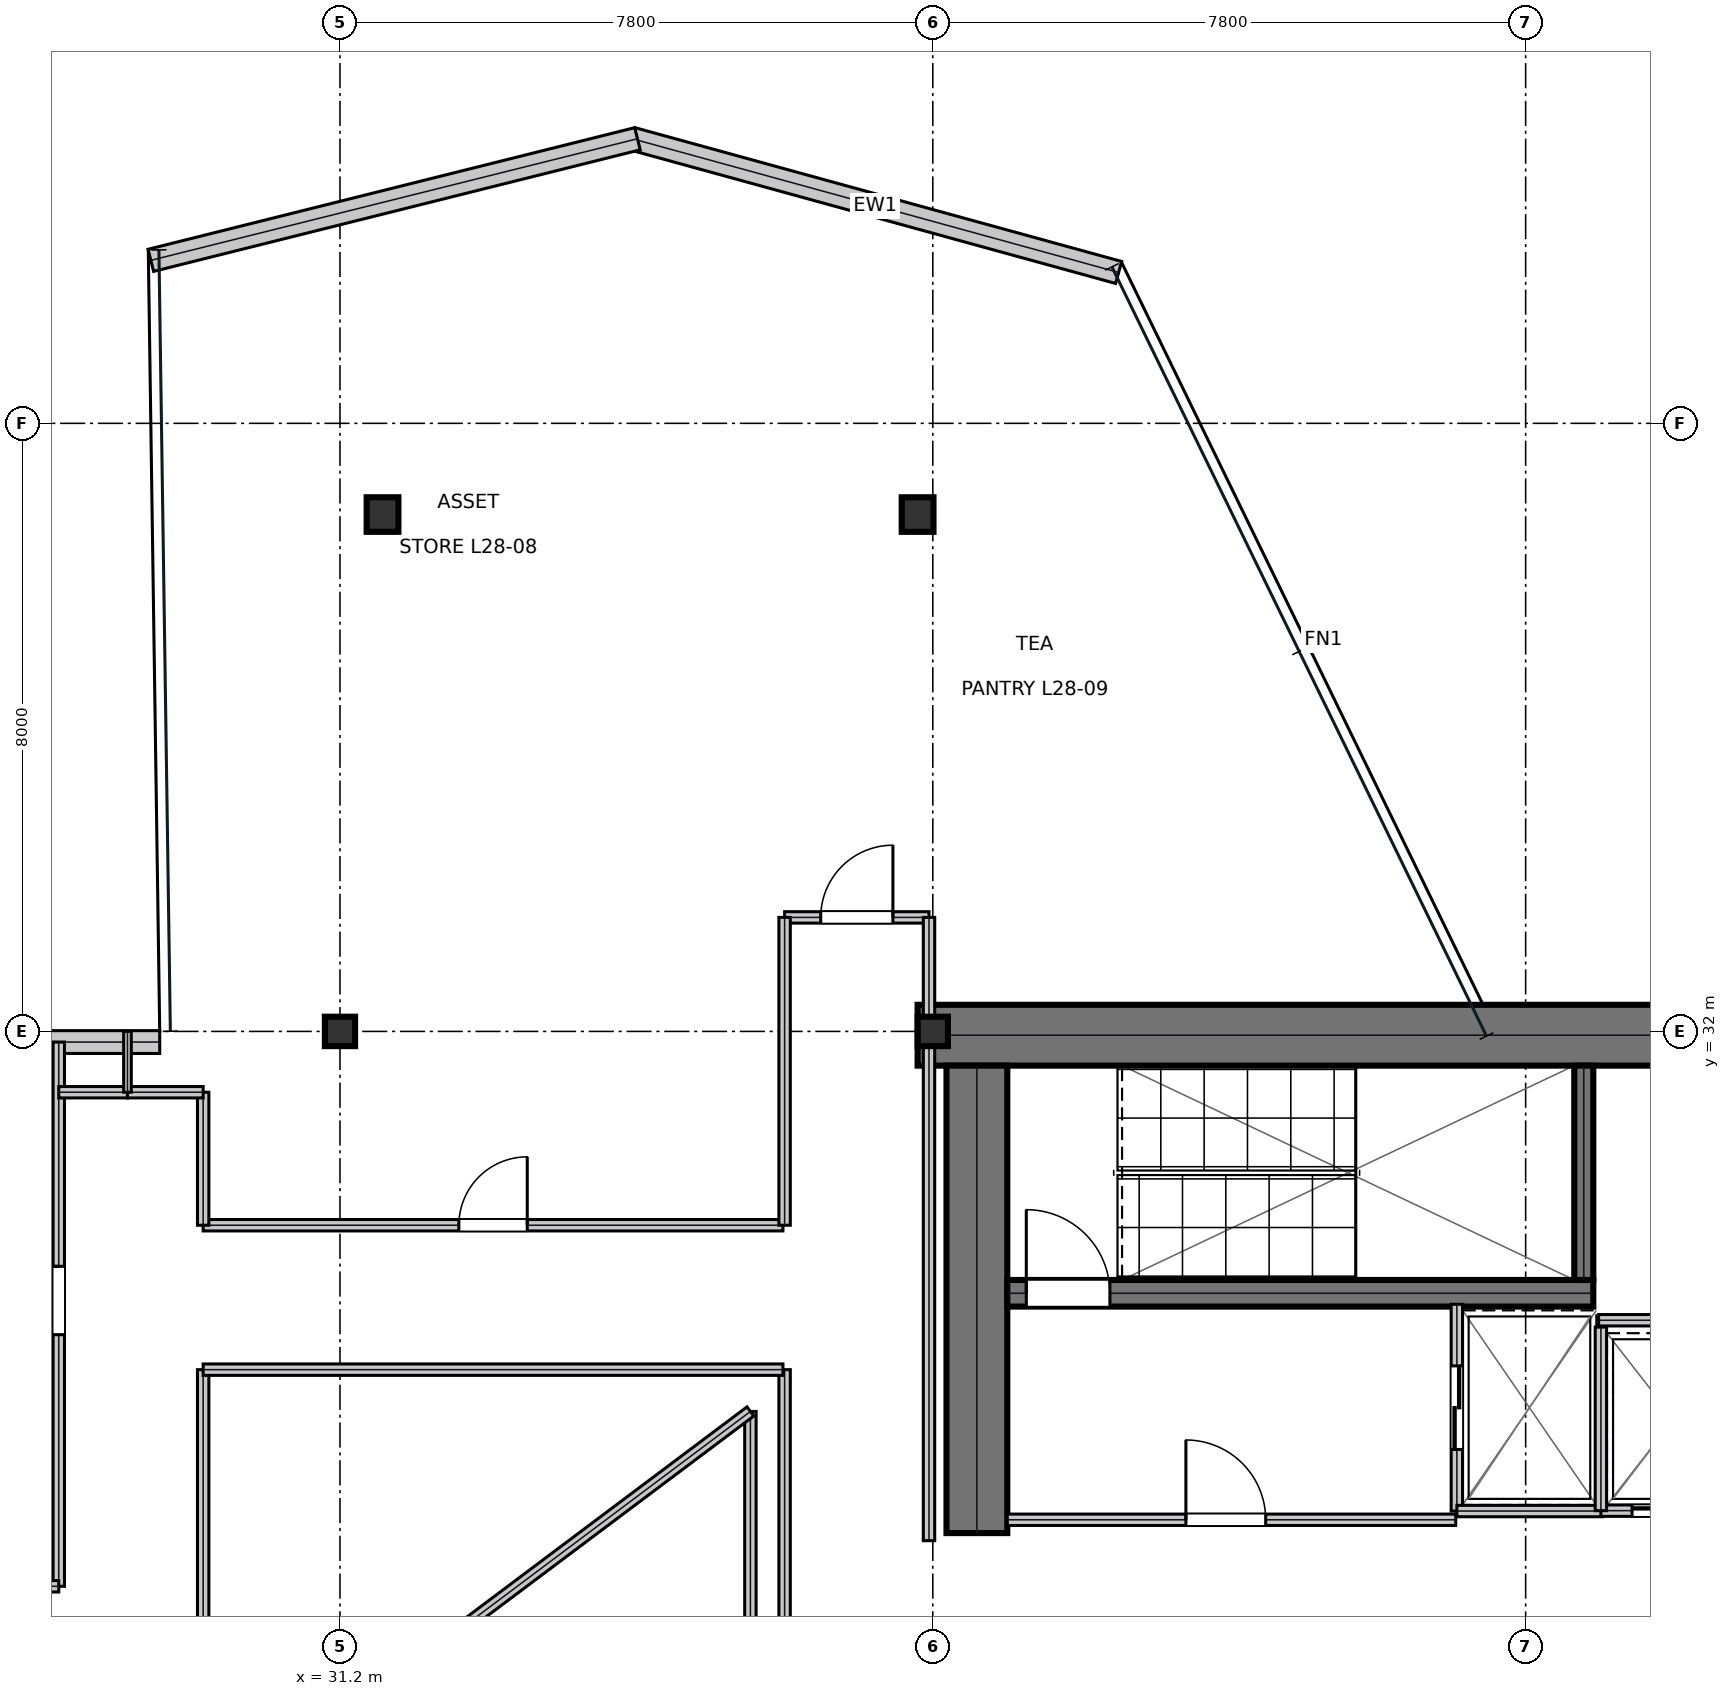
"""IFC4 building model, lengths in metres.
Left out: names, types, materials, properties, quantities, classifications, styles, units other than length and angle.
Written with IfcOpenShell. Run it as: python <this file> out.ifc"""

import sys

from ifc_helpers import new_model, si_unit, direction, frame, frame_2d, origin, origin_2d, place, context, subcontext, project, spatial, rectangle, i_section, extrude, element, fill, save


model = new_model("IFC4")
c1 = context("Model", 3, precision=1e-05, world=origin(), true_north=direction((0.0, 1.0)))
c2 = subcontext(c1, "Body", "Model", "MODEL_VIEW")
j1 = project(units=[si_unit("LENGTHUNIT", "METRE"), si_unit("PLANEANGLEUNIT", "RADIAN")], contexts=[c1])
p1 = place(None, origin())
s1 = spatial("IfcSite", under=j1, at=p1, CompositionType="ELEMENT")
p2 = place(p1, origin())
s2 = spatial("IfcBuilding", under=s1, at=p2, CompositionType="ELEMENT")
p3 = place(p2, frame((0.0, 0.0, 124.95)))
s3 = spatial("IfcBuildingStorey", under=s2, at=p3, CompositionType="ELEMENT", Elevation=124.95)
p4 = place(p3, frame((38.8, 31.95, 0.0), z_axis=(0.0, 0.0, 1.0), x_axis=(1.0, 0.0, 0.0)))
e1 = element("IfcWall", 1, at=p4, inside=s3, PredefinedType="SHEAR", context=c2, shape_type="SweptSolid", body=[
    extrude(rectangle(XDim=16.0, YDim=0.8, at=frame_2d((8.0, 0.0))), origin(), (0.0, 0.0, 1.0), 3.81),
])
p5 = place(p3, frame((39.58, 25.4, 0.0), z_axis=(0.0, 0.0, 1.0), x_axis=(0.0, 1.0, 0.0)))
e2 = element("IfcWall", 2, at=p5, inside=s3, PredefinedType="SHEAR", context=c2, shape_type="SweptSolid", body=[
    extrude(rectangle(XDim=6.15, YDim=0.8, at=frame_2d((3.075, 0.0))), origin(), (0.0, 0.0, 1.0), 3.81),
])
p6 = place(p3, frame((39.98, 28.555, 0.0), z_axis=(0.0, 0.0, 1.0), x_axis=(1.0, 0.0, 0.0)))
e3 = element("IfcWall", 3, at=p6, inside=s3, PredefinedType="SHEAR", context=c2, shape_type="SweptSolid", body=[
    extrude(rectangle(XDim=7.71, YDim=0.35, at=frame_2d((3.855, 0.0))), origin(), (0.0, 0.0, 1.0), 3.81),
])
p7 = place(p6, frame((0.25, 0.0, 0.0)))
e4 = element("IfcOpeningElement", 4, at=p7, cuts=e3, PredefinedType="OPENING", context=c2, shape_type="SweptSolid", body=[
    extrude(rectangle(XDim=1.1, YDim=2.15, at=frame_2d((0.55, 1.075))), frame((0.0, 0.185, 0.0), z_axis=(0.0, -1.0, 0.0), x_axis=(1.0, 0.0, 0.0)), (0.0, 0.0, 1.0), 0.37),
])
p8 = place(p3, frame((47.565, 28.73, 0.0), z_axis=(0.0, 0.0, 1.0), x_axis=(0.0, 1.0, 0.0)))
e5 = element("IfcWall", 5, at=p8, inside=s3, PredefinedType="SHEAR", context=c2, shape_type="SweptSolid", body=[
    extrude(rectangle(XDim=2.82, YDim=0.25, at=frame_2d((1.41, 0.0))), origin(), (0.0, 0.0, 1.0), 3.81),
])
for number, where, z_axis, x_axis in (
    (6, (31.2, 32.0, 0.0), (0.0, 0.0, 1.0), (1.0, 0.0, 0.0)),
    (7, (39.0, 32.0, 0.0), (0.0, 0.0, 1.0), (1.0, 0.0, 0.0)),
):
    element("IfcColumn", number, at=place(p3, frame(where, z_axis=z_axis, x_axis=x_axis)), inside=s3, PredefinedType="COLUMN", context=c2, shape_type="SweptSolid", body=[
        extrude(i_section(OverallWidth=0.398, OverallDepth=0.387, WebThickness=0.021, FlangeThickness=0.033, at=origin_2d()), origin(), (0.0, 0.0, 1.0), 4.044),
    ])
p9 = place(p3, frame((31.76, 38.8, 0.016), z_axis=(0.017424577167, -0.037338379644, 0.999150754149), x_axis=(0.906183139995, 0.422885465331, 0.0)))
e8 = element("IfcColumn", 8, at=p9, inside=s3, PredefinedType="COLUMN", context=c2, shape_type="SweptSolid", body=[
    extrude(i_section(OverallWidth=0.418, OverallDepth=0.455, WebThickness=0.042, FlangeThickness=0.068, at=origin_2d()), origin(), (0.0, 0.0, 1.0), 4.021),
])
p10 = place(p3, frame((38.8, 38.8, 0.016), z_axis=(-0.006254246892, -0.037343318823, 0.999282923368), x_axis=(0.986263587143, -0.165179104839, 0.0)))
e9 = element("IfcColumn", 9, at=p10, inside=s3, PredefinedType="COLUMN", context=c2, shape_type="SweptSolid", body=[
    extrude(i_section(OverallWidth=0.418, OverallDepth=0.455, WebThickness=0.042, FlangeThickness=0.068, at=origin_2d()), origin(), (0.0, 0.0, 1.0), 4.021),
])
p11 = place(p3, frame((41.445, 41.985, 0.0), z_axis=(0.0, 0.0, 1.0), x_axis=(-0.96422724659, 0.265077001894, 0.0)))
e10 = element("IfcWall", 10, at=p11, inside=s3, PredefinedType="STANDARD", context=c2, shape_type="SweptSolid", body=[
    extrude(rectangle(XDim=6.64, YDim=0.3, at=frame_2d((3.32, 0.0))), origin(), (0.0, 0.0, 1.0), 3.81),
])
p12 = place(p3, frame((35.114, 43.744, 0.0), z_axis=(0.0, 0.0, 1.0), x_axis=(-0.970168608955, -0.242431165897, 0.0)))
e11 = element("IfcWall", 11, at=p12, inside=s3, PredefinedType="STANDARD", context=c2, shape_type="SweptSolid", body=[
    extrude(rectangle(XDim=6.599, YDim=0.3, at=frame_2d((3.3, 0.0))), origin(), (0.0, 0.0, 1.0), 3.81),
])
p13 = place(p3, frame((28.828, 31.86, 0.0), z_axis=(0.0, 0.0, 1.0), x_axis=(-1.0, 0.0, 0.0)))
e12 = element("IfcWall", 12, at=p13, inside=s3, PredefinedType="STANDARD", context=c2, shape_type="SweptSolid", body=[
    extrude(rectangle(XDim=2.788, YDim=0.3, at=frame_2d((1.394, 0.0))), origin(), (0.0, 0.0, 1.0), 3.81),
])
p14 = place(p3, frame((39.98, 25.575, 0.0), z_axis=(0.0, 0.0, 1.0), x_axis=(1.0, 0.0, 0.0)))
e13 = element("IfcWall", 13, at=p14, inside=s3, PredefinedType="PARTITIONING", context=c2, shape_type="SweptSolid", body=[
    extrude(rectangle(XDim=5.9, YDim=0.15, at=frame_2d((2.95, 0.0))), origin(), (0.0, 0.0, 1.0), 3.81),
])
p15 = place(p14, frame((2.35, 0.0, 0.0)))
e14 = element("IfcOpeningElement", 14, at=p15, cuts=e13, PredefinedType="OPENING", context=c2, shape_type="SweptSolid", body=[
    extrude(rectangle(XDim=1.05, YDim=2.15, at=frame_2d((0.525, 1.075))), frame((0.0, 0.085, 0.0), z_axis=(0.0, -1.0, 0.0), x_axis=(1.0, 0.0, 0.0)), (0.0, 0.0, 1.0), 0.17),
])
p16 = place(p3, frame((45.895, 25.69, 0.0), z_axis=(0.0, 0.0, 1.0), x_axis=(0.0, 1.0, 0.0)))
e15 = element("IfcWall", 15, at=p16, inside=s3, PredefinedType="PARTITIONING", context=c2, shape_type="SweptSolid", body=[
    extrude(rectangle(XDim=2.72, YDim=0.15, at=frame_2d((1.36, 0.0))), origin(), (0.0, 0.0, 1.0), 3.81),
])
p17 = place(p16, frame((0.81, 0.0, 0.0)))
e16 = element("IfcOpeningElement", 16, at=p17, cuts=e15, PredefinedType="OPENING", context=c2, shape_type="SweptSolid", body=[
    extrude(rectangle(XDim=1.1, YDim=2.15, at=frame_2d((0.55, 1.075))), frame((0.0, 0.085, 0.0), z_axis=(0.0, -1.0, 0.0), x_axis=(1.0, 0.0, 0.0)), (0.0, 0.0, 1.0), 0.17),
])
p18 = place(p3, frame((45.895, 25.69, 0.0), z_axis=(0.0, 0.0, 1.0), x_axis=(1.0, 0.0, 0.0)))
e17 = element("IfcWall", 17, at=p18, inside=s3, PredefinedType="PARTITIONING", context=c2, shape_type="SweptSolid", body=[
    extrude(rectangle(XDim=1.915, YDim=0.15, at=frame_2d((0.958, 0.0))), origin(), (0.0, 0.0, 1.0), 3.81),
])
p19 = place(p3, frame((47.79, 25.695, 0.0), z_axis=(0.0, 0.0, 1.0), x_axis=(1.0, 0.0, 0.0)))
e18 = element("IfcWall", 18, at=p19, inside=s3, PredefinedType="PARTITIONING", context=c2, shape_type="SweptSolid", body=[
    extrude(rectangle(XDim=1.92, YDim=0.15, at=frame_2d((0.96, 0.0))), origin(), (0.0, 0.0, 1.0), 3.81),
])
p20 = place(p19, frame((0.41, 0.0, 0.0)))
e19 = element("IfcOpeningElement", 19, at=p20, cuts=e18, PredefinedType="OPENING", context=c2, shape_type="SweptSolid", body=[
    extrude(rectangle(XDim=1.1, YDim=2.15, at=frame_2d((0.55, 1.075))), frame((0.0, 0.085, 0.0), z_axis=(0.0, -1.0, 0.0), x_axis=(1.0, 0.0, 0.0)), (0.0, 0.0, 1.0), 0.17),
])
p21 = place(p3, frame((47.79, 25.695, 0.0), z_axis=(0.0, 0.0, 1.0), x_axis=(0.0, 1.0, 0.0)))
e20 = element("IfcWall", 20, at=p21, inside=s3, PredefinedType="PARTITIONING", context=c2, shape_type="SweptSolid", body=[
    extrude(rectangle(XDim=2.415, YDim=0.15, at=frame_2d((1.208, 0.0))), origin(), (0.0, 0.0, 1.0), 3.81),
])
p22 = place(p3, frame((47.76, 28.2, 0.0), z_axis=(0.0, 0.0, 1.0), x_axis=(1.0, 0.0, 0.0)))
e21 = element("IfcWall", 21, at=p22, inside=s3, PredefinedType="PARTITIONING", context=c2, shape_type="SweptSolid", body=[
    extrude(rectangle(XDim=1.99, YDim=0.15, at=frame_2d((0.995, 0.0))), origin(), (0.0, 0.0, 1.0), 3.81),
])
p23 = place(p3, frame((37.05, 14.5, 0.0), z_axis=(0.0, 0.0, 1.0), x_axis=(0.0, 1.0, 0.0)))
e22 = element("IfcWall", 22, at=p23, inside=s3, PredefinedType="PARTITIONING", context=c2, shape_type="SweptSolid", body=[
    extrude(rectangle(XDim=13.05, YDim=0.15, at=frame_2d((6.525, 0.0))), origin(), (0.0, 0.0, 1.0), 3.19),
])
p24 = place(p23, frame((4.635, 0.0, 0.0)))
e23 = element("IfcOpeningElement", 23, at=p24, cuts=e22, PredefinedType="OPENING", context=c2, shape_type="SweptSolid", body=[
    extrude(rectangle(XDim=0.9, YDim=2.15, at=frame_2d((0.45, 1.075))), frame((0.0, 0.085, 0.0), z_axis=(0.0, -1.0, 0.0), x_axis=(1.0, 0.0, 0.0)), (0.0, 0.0, 1.0), 0.17),
])
p25 = place(p3, frame((27.5, 24.7, 0.0), z_axis=(0.0, 0.0, 1.0), x_axis=(0.0, 1.0, 0.0)))
e24 = element("IfcWall", 24, at=p25, inside=s3, PredefinedType="PARTITIONING", context=c2, shape_type="SweptSolid", body=[
    extrude(rectangle(XDim=7.16, YDim=0.15, at=frame_2d((3.58, 0.0))), origin(), (0.0, 0.0, 1.0), 3.338),
])
p26 = place(p25, frame((3.31, 0.0, 0.0)))
e25 = element("IfcOpeningElement", 25, at=p26, cuts=e24, PredefinedType="OPENING", context=c2, shape_type="SweptSolid", body=[
    extrude(rectangle(XDim=0.9, YDim=2.15, at=frame_2d((0.45, 1.075))), frame((0.0, 0.085, 0.0), z_axis=(0.0, -1.0, 0.0), x_axis=(1.0, 0.0, 0.0)), (0.0, 0.0, 1.0), 0.17),
])
p27 = place(p3, frame((29.4, 29.45, 0.0), z_axis=(0.0, 0.0, 1.0), x_axis=(1.0, 0.0, 0.0)))
e26 = element("IfcWall", 26, at=p27, inside=s3, PredefinedType="PARTITIONING", context=c2, shape_type="SweptSolid", body=[
    extrude(rectangle(XDim=7.628, YDim=0.15, at=frame_2d((3.814, 0.0))), origin(), (0.0, 0.0, 1.0), 3.19),
])
p28 = place(p27, frame((3.364, 0.0, 0.0)))
e27 = element("IfcOpeningElement", 27, at=p28, cuts=e26, PredefinedType="OPENING", context=c2, shape_type="SweptSolid", body=[
    extrude(rectangle(XDim=0.9, YDim=2.15, at=frame_2d((0.45, 1.075))), frame((0.0, 0.085, 0.0), z_axis=(0.0, -1.0, 0.0), x_axis=(1.0, 0.0, 0.0)), (0.0, 0.0, 1.0), 0.17),
])
p29 = place(p3, frame((37.05, 33.5, 0.0), z_axis=(0.0, 0.0, 1.0), x_axis=(1.0, 0.0, 0.0)))
e28 = element("IfcWall", 28, at=p29, inside=s3, PredefinedType="PARTITIONING", context=c2, shape_type="SweptSolid", body=[
    extrude(rectangle(XDim=1.9, YDim=0.15, at=frame_2d((0.95, 0.0))), origin(), (0.0, 0.0, 1.0), 3.19),
])
p30 = place(p29, frame((0.475, 0.0, 0.0)))
e29 = element("IfcOpeningElement", 29, at=p30, cuts=e28, PredefinedType="OPENING", context=c2, shape_type="SweptSolid", body=[
    extrude(rectangle(XDim=0.95, YDim=2.15, at=frame_2d((0.475, 1.075))), frame((0.0, 0.085, 0.0), z_axis=(0.0, -1.0, 0.0), x_axis=(1.0, 0.0, 0.0)), (0.0, 0.0, 1.0), 0.17),
])
p31 = place(p3, frame((29.4, 16.8, 0.0), z_axis=(0.0, 0.0, 1.0), x_axis=(0.0, 1.0, 0.0)))
e30 = element("IfcWall", 30, at=p31, inside=s3, PredefinedType="PARTITIONING", context=c2, shape_type="SweptSolid", body=[
    extrude(rectangle(XDim=10.75, YDim=0.15, at=frame_2d((5.375, 0.0))), origin(), (0.0, 0.0, 1.0), 3.19),
])
p32 = place(p3, frame((29.4, 27.55, 0.0), z_axis=(0.0, 0.0, 1.0), x_axis=(1.0, 0.0, 0.0)))
e31 = element("IfcWall", 31, at=p32, inside=s3, PredefinedType="PARTITIONING", context=c2, shape_type="SweptSolid", body=[
    extrude(rectangle(XDim=7.628, YDim=0.15, at=frame_2d((3.814, 0.0))), origin(), (0.0, 0.0, 1.0), 3.19),
])
p33 = place(p3, frame((23.1, 24.7, 0.0), z_axis=(0.0, 0.0, 1.0), x_axis=(1.0, 0.0, 0.0)))
e32 = element("IfcWall", 32, at=p33, inside=s3, PredefinedType="PARTITIONING", context=c2, shape_type="SweptSolid", body=[
    extrude(rectangle(XDim=4.4, YDim=0.15, at=frame_2d((2.2, 0.0))), origin(), (0.0, 0.0, 1.0), 3.19),
])
p34 = place(p3, frame((27.5, 31.2, 0.0), z_axis=(0.0, 0.0, 1.0), x_axis=(1.0, 0.0, 0.0)))
e33 = element("IfcWall", 33, at=p34, inside=s3, PredefinedType="PARTITIONING", context=c2, shape_type="SweptSolid", body=[
    extrude(rectangle(XDim=0.904, YDim=0.15, at=frame_2d((0.452, 0.0))), origin(), (0.0, 0.0, 1.0), 3.338),
])
p35 = place(p3, frame((37.05, 29.45, 0.0), z_axis=(0.0, 0.0, 1.0), x_axis=(0.0, 1.0, 0.0)))
e34 = element("IfcWall", 34, at=p35, inside=s3, PredefinedType="PARTITIONING", context=c2, shape_type="SweptSolid", body=[
    extrude(rectangle(XDim=4.05, YDim=0.15, at=frame_2d((2.025, 0.0))), origin(), (0.0, 0.0, 1.0), 3.19),
])
p36 = place(p3, frame((29.4, 29.45, 0.0), z_axis=(0.0, 0.0, 1.0), x_axis=(0.0, 1.0, 0.0)))
e35 = element("IfcWall", 35, at=p36, inside=s3, PredefinedType="PARTITIONING", context=c2, shape_type="SweptSolid", body=[
    extrude(rectangle(XDim=1.75, YDim=0.15, at=frame_2d((0.875, 0.0))), origin(), (0.0, 0.0, 1.0), 3.81),
])
p37 = place(p3, frame((28.404, 31.2, 0.0), z_axis=(0.0, 0.0, 1.0), x_axis=(1.0, 0.0, 0.0)))
e36 = element("IfcWall", 36, at=p37, inside=s3, PredefinedType="PARTITIONING", context=c2, shape_type="SweptSolid", body=[
    extrude(rectangle(XDim=0.996, YDim=0.15, at=frame_2d((0.498, 0.0))), origin(), (0.0, 0.0, 1.0), 3.81),
])
p38 = place(p3, frame((38.95, 25.3, 0.0), z_axis=(0.0, 0.0, 1.0), x_axis=(0.0, 1.0, 0.0)))
e37 = element("IfcWall", 37, at=p38, inside=s3, PredefinedType="PARTITIONING", context=c2, shape_type="SweptSolid", body=[
    extrude(rectangle(XDim=8.2, YDim=0.15, at=frame_2d((4.1, 0.0))), origin(), (0.0, 0.0, 1.0), 3.19),
])
p39 = place(p3, frame((28.404, 31.2, 0.0), z_axis=(0.0, 0.0, 1.0), x_axis=(0.0, 1.0, 0.0)))
e38 = element("IfcWall", 38, at=p39, inside=s3, PredefinedType="PARTITIONING", context=c2, shape_type="SweptSolid", body=[
    extrude(rectangle(XDim=0.8, YDim=0.1, at=frame_2d((0.4, 0.0))), origin(), (0.0, 0.0, 1.0), 3.338),
])
p40 = place(p3, frame((36.6, 21.0, 0.0), z_axis=(0.0, 0.0, 1.0), x_axis=(0.0, 1.0, 0.0)))
e39 = element("IfcWall", 39, at=p40, inside=s3, PredefinedType="MOVABLE", context=c2, shape_type="SweptSolid", body=[
    extrude(rectangle(XDim=6.0, YDim=0.15, at=frame_2d((3.0, 0.0))), origin(), (0.0, 0.0, 1.0), 3.81),
])
p41 = place(p3, frame((36.6, 27.0, 0.0), z_axis=(0.0, 0.0, 1.0), x_axis=(-0.8, -0.6, 0.0)))
e40 = element("IfcWall", 40, at=p41, inside=s3, PredefinedType="MOVABLE", context=c2, shape_type="SweptSolid", body=[
    extrude(rectangle(XDim=5.0, YDim=0.15, at=frame_2d((2.5, 0.0))), origin(), (0.0, 0.0, 1.0), 3.81),
])
p42 = place(p15, origin())
e41 = element("IfcDoor", 41, at=p42, inside=s3, OperationType="SINGLE_SWING_LEFT", PredefinedType="DOOR", context=c2, shape_type="SweptSolid", body=[
    extrude(rectangle(XDim=1.05, YDim=2.15, at=frame_2d((0.525, 1.075))), frame((0.0, 0.025, 0.0), z_axis=(0.0, -1.0, 0.0), x_axis=(1.0, 0.0, 0.0)), (0.0, 0.0, 1.0), 0.05),
])
fill(e14, e41)
p43 = place(p17, frame((1.1, 0.0, 0.0), z_axis=(0.0, 0.0, 1.0), x_axis=(-1.0, 0.0, 0.0)))
e42 = element("IfcDoor", 42, at=p43, inside=s3, OperationType="DOUBLE_DOOR_SLIDING", PredefinedType="DOOR", context=c2, shape_type="SweptSolid", body=[
    extrude(rectangle(XDim=1.1, YDim=2.15, at=frame_2d((0.55, 1.075))), frame((0.0, 0.025, 0.0), z_axis=(0.0, -1.0, 0.0), x_axis=(1.0, 0.0, 0.0)), (0.0, 0.0, 1.0), 0.05),
])
fill(e16, e42)
p44 = place(p20, frame((1.1, 0.0, 0.0), z_axis=(0.0, 0.0, 1.0), x_axis=(-1.0, 0.0, 0.0)))
e43 = element("IfcDoor", 43, at=p44, inside=s3, OperationType="DOUBLE_DOOR_SLIDING", PredefinedType="DOOR", context=c2, shape_type="SweptSolid", body=[
    extrude(rectangle(XDim=1.1, YDim=2.15, at=frame_2d((0.55, 1.075))), frame((0.0, 0.025, 0.0), z_axis=(0.0, -1.0, 0.0), x_axis=(1.0, 0.0, 0.0)), (0.0, 0.0, 1.0), 0.05),
])
fill(e19, e43)
p45 = place(p26, origin())
e44 = element("IfcDoor", 44, at=p45, inside=s3, OperationType="SINGLE_SWING_RIGHT", PredefinedType="DOOR", context=c2, shape_type="SweptSolid", body=[
    extrude(rectangle(XDim=0.9, YDim=2.15, at=frame_2d((0.45, 1.075))), frame((0.0, 0.025, 0.0), z_axis=(0.0, -1.0, 0.0), x_axis=(1.0, 0.0, 0.0)), (0.0, 0.0, 1.0), 0.05),
])
fill(e25, e44)
p46 = place(p28, origin())
e45 = element("IfcDoor", 45, at=p46, inside=s3, OperationType="SINGLE_SWING_RIGHT", PredefinedType="DOOR", context=c2, shape_type="SweptSolid", body=[
    extrude(rectangle(XDim=0.9, YDim=2.15, at=frame_2d((0.45, 1.075))), frame((0.0, 0.025, 0.0), z_axis=(0.0, -1.0, 0.0), x_axis=(1.0, 0.0, 0.0)), (0.0, 0.0, 1.0), 0.05),
])
fill(e27, e45)
p47 = place(p30, origin())
e46 = element("IfcDoor", 46, at=p47, inside=s3, OperationType="SINGLE_SWING_RIGHT", PredefinedType="DOOR", context=c2, shape_type="SweptSolid", body=[
    extrude(rectangle(XDim=0.95, YDim=2.15, at=frame_2d((0.475, 1.075))), frame((0.0, 0.025, 0.0), z_axis=(0.0, -1.0, 0.0), x_axis=(1.0, 0.0, 0.0)), (0.0, 0.0, 1.0), 0.05),
])
fill(e29, e46)
p48 = place(p7, origin())
e47 = element("IfcDoor", 47, at=p48, inside=s3, OperationType="SINGLE_SWING_LEFT", PredefinedType="DOOR", context=c2, shape_type="SweptSolid", body=[
    extrude(rectangle(XDim=1.1, YDim=2.15, at=frame_2d((0.55, 1.075))), frame((0.0, 0.025, 0.0), z_axis=(0.0, -1.0, 0.0), x_axis=(1.0, 0.0, 0.0)), (0.0, 0.0, 1.0), 0.05),
])
fill(e4, e47)
save(model, sys.argv[1])
